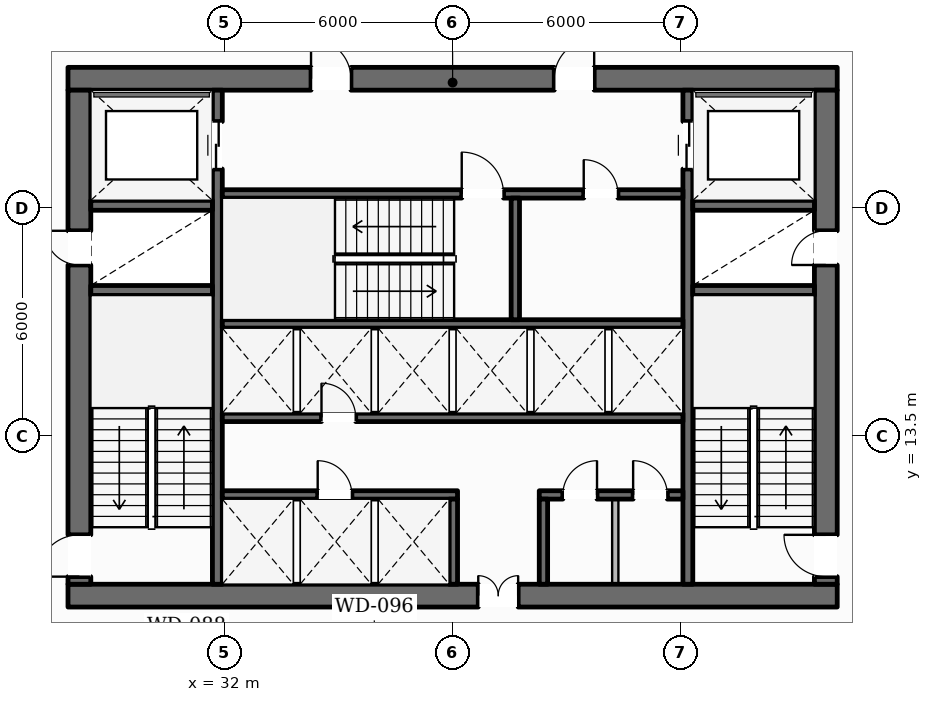
"""IFC4 building model, lengths in metres.
Left out: names, types, materials, properties, quantities, classifications, styles, units other than length and angle.
Written with IfcOpenShell. Run it as: python <this file> out.ifc"""

import sys

from ifc_helpers import new_model, si_unit, direction, frame, frame_2d, origin, place, context, subcontext, project, spatial, rectangle, extrude, element, fill, save


model = new_model("IFC4")
c1 = context("Model", 3, precision=1e-05, world=origin(), true_north=direction((0.0, 1.0)))
c2 = subcontext(c1, "Body", "Model", "MODEL_VIEW")
j1 = project(units=[si_unit("LENGTHUNIT", "METRE"), si_unit("PLANEANGLEUNIT", "RADIAN")], contexts=[c1])
p1 = place(None, origin())
s1 = spatial("IfcSite", under=j1, at=p1, CompositionType="ELEMENT")
p2 = place(p1, origin())
s2 = spatial("IfcBuilding", under=s1, at=p2, CompositionType="ELEMENT")
p3 = place(p2, frame((0.0, 0.0, -4.2)))
s3 = spatial("IfcBuildingStorey", under=s2, at=p3, CompositionType="ELEMENT", Elevation=-4.2)
for number, where, z_axis, x_axis in (
    (1, (29.622, 43.889, 0.0), (0.0, 0.0, 1.0), (-0.5, -0.866, 0.0)),
    (2, (62.878, 15.311, 0.0), (0.0, 0.0, 1.0), (-0.5, 0.866, 0.0)),
):
    element("IfcWall", number, at=place(p3, frame(where, z_axis=z_axis, x_axis=x_axis)), inside=s3, PredefinedType="SHEAR", context=c2, shape_type="SweptSolid", body=[
        extrude(rectangle(XDim=33.0, YDim=0.5, at=frame_2d((16.5, 0.0))), origin(), (0.0, 0.0, 1.0), 3.94),
    ])
p4 = place(p3, frame((27.88, 9.3, 0.0), z_axis=(0.0, 0.0, 1.0), x_axis=(1.0, 0.0, 0.0)))
e3 = element("IfcWall", 3, at=p4, inside=s3, PredefinedType="SOLIDWALL", context=c2, shape_type="SweptSolid", body=[
    extrude(rectangle(XDim=20.24, YDim=0.6, at=frame_2d((10.12, 0.0))), origin(), (0.0, 0.0, 1.0), 3.94),
])
p5 = place(p4, frame((10.795, 0.0, 0.0)))
e4 = element("IfcOpeningElement", 4, at=p5, cuts=e3, PredefinedType="OPENING", context=c2, shape_type="SweptSolid", body=[
    extrude(rectangle(XDim=1.05, YDim=2.15, at=frame_2d((0.525, 1.075))), frame((0.0, 0.31, 0.0), z_axis=(0.0, -1.0, 0.0), x_axis=(1.0, 0.0, 0.0)), (0.0, 0.0, 1.0), 0.62),
])
p6 = place(p3, frame((27.88, 22.9, 0.0), z_axis=(0.0, 0.0, 1.0), x_axis=(1.0, 0.0, 0.0)))
e5 = element("IfcWall", 5, at=p6, inside=s3, PredefinedType="SOLIDWALL", context=c2, shape_type="SweptSolid", body=[
    extrude(rectangle(XDim=20.24, YDim=0.6, at=frame_2d((10.12, 0.0))), origin(), (0.0, 0.0, 1.0), 3.94),
])
p7 = place(p6, frame((6.395, 0.0, 0.0)))
e6 = element("IfcOpeningElement", 6, at=p7, cuts=e5, PredefinedType="OPENING", context=c2, shape_type="SweptSolid", body=[
    extrude(rectangle(XDim=1.05, YDim=2.15, at=frame_2d((0.525, 1.075))), frame((0.0, 0.31, 0.0), z_axis=(0.0, -1.0, 0.0), x_axis=(1.0, 0.0, 0.0)), (0.0, 0.0, 1.0), 0.62),
])
p8 = place(p6, frame((12.795, 0.0, 0.0)))
e7 = element("IfcOpeningElement", 7, at=p8, cuts=e5, PredefinedType="OPENING", context=c2, shape_type="SweptSolid", body=[
    extrude(rectangle(XDim=1.05, YDim=2.15, at=frame_2d((0.525, 1.075))), frame((0.0, 0.31, 0.0), z_axis=(0.0, -1.0, 0.0), x_axis=(1.0, 0.0, 0.0)), (0.0, 0.0, 1.0), 0.62),
])
p9 = place(p3, frame((28.18, 9.6, 0.0), z_axis=(0.0, 0.0, 1.0), x_axis=(0.0, 1.0, 0.0)))
e8 = element("IfcWall", 8, at=p9, inside=s3, PredefinedType="SOLIDWALL", context=c2, shape_type="SweptSolid", body=[
    extrude(rectangle(XDim=13.0, YDim=0.6, at=frame_2d((6.5, 0.0))), origin(), (0.0, 0.0, 1.0), 3.94),
])
p10 = place(p9, frame((0.2, 0.0, 0.0)))
e9 = element("IfcOpeningElement", 9, at=p10, cuts=e8, PredefinedType="OPENING", context=c2, shape_type="SweptSolid", body=[
    extrude(rectangle(XDim=1.1, YDim=2.15, at=frame_2d((0.55, 1.075))), frame((0.0, 0.31, 0.0), z_axis=(0.0, -1.0, 0.0), x_axis=(1.0, 0.0, 0.0)), (0.0, 0.0, 1.0), 0.62),
])
p11 = place(p9, frame((8.4, 0.0, 0.0)))
e10 = element("IfcOpeningElement", 10, at=p11, cuts=e8, PredefinedType="OPENING", context=c2, shape_type="SweptSolid", body=[
    extrude(rectangle(XDim=0.9, YDim=2.1, at=frame_2d((0.45, 1.05))), frame((0.0, 0.31, 0.0), z_axis=(0.0, -1.0, 0.0), x_axis=(1.0, 0.0, 0.0)), (0.0, 0.0, 1.0), 0.62),
])
p12 = place(p3, frame((47.82, 9.6, 0.0), z_axis=(0.0, 0.0, 1.0), x_axis=(0.0, 1.0, 0.0)))
e11 = element("IfcWall", 11, at=p12, inside=s3, PredefinedType="SOLIDWALL", context=c2, shape_type="SweptSolid", body=[
    extrude(rectangle(XDim=13.0, YDim=0.6, at=frame_2d((6.5, 0.0))), origin(), (0.0, 0.0, 1.0), 3.94),
])
p13 = place(p12, frame((0.2, 0.0, 0.0)))
e12 = element("IfcOpeningElement", 12, at=p13, cuts=e11, PredefinedType="OPENING", context=c2, shape_type="SweptSolid", body=[
    extrude(rectangle(XDim=1.1, YDim=2.15, at=frame_2d((0.55, 1.075))), frame((0.0, 0.31, 0.0), z_axis=(0.0, -1.0, 0.0), x_axis=(1.0, 0.0, 0.0)), (0.0, 0.0, 1.0), 0.62),
])
p14 = place(p12, frame((8.4, 0.0, 0.0)))
e13 = element("IfcOpeningElement", 13, at=p14, cuts=e11, PredefinedType="OPENING", context=c2, shape_type="SweptSolid", body=[
    extrude(rectangle(XDim=0.9, YDim=2.1, at=frame_2d((0.45, 1.05))), frame((0.0, 0.31, 0.0), z_axis=(0.0, -1.0, 0.0), x_axis=(1.0, 0.0, 0.0)), (0.0, 0.0, 1.0), 0.62),
])
p15 = place(p3, frame((31.81, 9.6, 0.0), z_axis=(0.0, 0.0, 1.0), x_axis=(0.0, 1.0, 0.0)))
e14 = element("IfcWall", 14, at=p15, inside=s3, PredefinedType="SHEAR", context=c2, shape_type="SweptSolid", body=[
    extrude(rectangle(XDim=13.0, YDim=0.26, at=frame_2d((6.5, 0.0))), origin(), (0.0, 0.0, 1.0), 3.94),
])
p16 = place(p15, frame((10.925, 0.0, 0.0)))
e15 = element("IfcOpeningElement", 15, at=p16, cuts=e14, PredefinedType="OPENING", context=c2, shape_type="SweptSolid", body=[
    extrude(rectangle(XDim=1.25, YDim=2.25, at=frame_2d((0.625, 1.125))), frame((0.0, 0.14, 0.0), z_axis=(0.0, -1.0, 0.0), x_axis=(1.0, 0.0, 0.0)), (0.0, 0.0, 1.0), 0.28),
])
p17 = place(p3, frame((44.19, 9.6, 0.0), z_axis=(0.0, 0.0, 1.0), x_axis=(0.0, 1.0, 0.0)))
e16 = element("IfcWall", 16, at=p17, inside=s3, PredefinedType="SHEAR", context=c2, shape_type="SweptSolid", body=[
    extrude(rectangle(XDim=13.0, YDim=0.26, at=frame_2d((6.5, 0.0))), origin(), (0.0, 0.0, 1.0), 3.94),
])
p18 = place(p17, frame((10.925, 0.0, 0.0)))
e17 = element("IfcOpeningElement", 17, at=p18, cuts=e16, PredefinedType="OPENING", context=c2, shape_type="SweptSolid", body=[
    extrude(rectangle(XDim=1.25, YDim=2.25, at=frame_2d((0.625, 1.125))), frame((0.0, 0.14, 0.0), z_axis=(0.0, -1.0, 0.0), x_axis=(1.0, 0.0, 0.0)), (0.0, 0.0, 1.0), 0.28),
])
for number, where, z_axis, x_axis in (
    (18, (28.48, 17.33, 0.0), (0.0, 0.0, 1.0), (1.0, 0.0, 0.0)),
    (19, (28.48, 19.57, 0.0), (0.0, 0.0, 1.0), (1.0, 0.0, 0.0)),
    (20, (44.32, 17.33, 0.0), (0.0, 0.0, 1.0), (1.0, 0.0, 0.0)),
    (21, (44.32, 19.57, 0.0), (0.0, 0.0, 1.0), (1.0, 0.0, 0.0)),
):
    element("IfcWall", number, at=place(p3, frame(where, z_axis=z_axis, x_axis=x_axis)), inside=s3, PredefinedType="SHEAR", context=c2, shape_type="SweptSolid", body=[
        extrude(rectangle(XDim=3.2, YDim=0.26, at=frame_2d((1.6, 0.0))), origin(), (0.0, 0.0, 1.0), 3.94),
    ])
p19 = place(p3, frame((31.94, 19.87, 0.0), z_axis=(0.0, 0.0, 1.0), x_axis=(1.0, 0.0, 0.0)))
e22 = element("IfcWall", 22, at=p19, inside=s3, PredefinedType="SOLIDWALL", context=c2, shape_type="SweptSolid", body=[
    extrude(rectangle(XDim=12.12, YDim=0.22, at=frame_2d((6.06, 0.0))), origin(), (0.0, 0.0, 1.0), 3.94),
])
p20 = place(p19, frame((6.3, 0.0, 0.0)))
e23 = element("IfcOpeningElement", 23, at=p20, cuts=e22, PredefinedType="OPENING", context=c2, shape_type="SweptSolid", body=[
    extrude(rectangle(XDim=1.1, YDim=2.15, at=frame_2d((0.55, 1.075))), frame((0.0, 0.12, 0.0), z_axis=(0.0, -1.0, 0.0), x_axis=(1.0, 0.0, 0.0)), (0.0, 0.0, 1.0), 0.24),
])
p21 = place(p19, frame((9.51, 0.0, 0.0)))
e24 = element("IfcOpeningElement", 24, at=p21, cuts=e22, PredefinedType="OPENING", context=c2, shape_type="SweptSolid", body=[
    extrude(rectangle(XDim=0.9, YDim=2.1, at=frame_2d((0.45, 1.05))), frame((0.0, 0.12, 0.0), z_axis=(0.0, -1.0, 0.0), x_axis=(1.0, 0.0, 0.0)), (0.0, 0.0, 1.0), 0.24),
])
p22 = place(p3, frame((31.94, 16.45, 0.0), z_axis=(0.0, 0.0, 1.0), x_axis=(1.0, 0.0, 0.0)))
e25 = element("IfcWall", 25, at=p22, inside=s3, PredefinedType="SOLIDWALL", context=c2, shape_type="SweptSolid", body=[
    extrude(rectangle(XDim=12.12, YDim=0.22, at=frame_2d((6.06, 0.0))), origin(), (0.0, 0.0, 1.0), 3.94),
])
p23 = place(p3, frame((39.65, 16.56, 0.0), z_axis=(0.0, 0.0, 1.0), x_axis=(0.0, 1.0, 0.0)))
e26 = element("IfcWall", 26, at=p23, inside=s3, PredefinedType="SOLIDWALL", context=c2, shape_type="SweptSolid", body=[
    extrude(rectangle(XDim=3.2, YDim=0.22, at=frame_2d((1.6, 0.0))), origin(), (0.0, 0.0, 1.0), 3.94),
])
p24 = place(p3, frame((31.94, 13.99, 0.0), z_axis=(0.0, 0.0, 1.0), x_axis=(1.0, 0.0, 0.0)))
e27 = element("IfcWall", 27, at=p24, inside=s3, PredefinedType="SOLIDWALL", context=c2, shape_type="SweptSolid", body=[
    extrude(rectangle(XDim=12.12, YDim=0.22, at=frame_2d((6.06, 0.0))), origin(), (0.0, 0.0, 1.0), 3.94),
])
p25 = place(p24, frame((2.61, 0.0, 0.0)))
e28 = element("IfcOpeningElement", 28, at=p25, cuts=e27, PredefinedType="OPENING", context=c2, shape_type="SweptSolid", body=[
    extrude(rectangle(XDim=0.9, YDim=2.1, at=frame_2d((0.45, 1.05))), frame((0.0, 0.12, 0.0), z_axis=(0.0, -1.0, 0.0), x_axis=(1.0, 0.0, 0.0)), (0.0, 0.0, 1.0), 0.24),
])
p26 = place(p3, frame((31.94, 11.95, 0.0), z_axis=(0.0, 0.0, 1.0), x_axis=(1.0, 0.0, 0.0)))
e29 = element("IfcWall", 29, at=p26, inside=s3, PredefinedType="SOLIDWALL", context=c2, shape_type="SweptSolid", body=[
    extrude(rectangle(XDim=6.19, YDim=0.22, at=frame_2d((3.095, 0.0))), origin(), (0.0, 0.0, 1.0), 3.94),
])
p27 = place(p26, frame((2.51, 0.0, 0.0)))
e30 = element("IfcOpeningElement", 30, at=p27, cuts=e29, PredefinedType="OPENING", context=c2, shape_type="SweptSolid", body=[
    extrude(rectangle(XDim=0.9, YDim=2.1, at=frame_2d((0.45, 1.05))), frame((0.0, 0.12, 0.0), z_axis=(0.0, -1.0, 0.0), x_axis=(1.0, 0.0, 0.0)), (0.0, 0.0, 1.0), 0.24),
])
p28 = place(p3, frame((40.28, 11.95, 0.0), z_axis=(0.0, 0.0, 1.0), x_axis=(1.0, 0.0, 0.0)))
e31 = element("IfcWall", 31, at=p28, inside=s3, PredefinedType="SOLIDWALL", context=c2, shape_type="SweptSolid", body=[
    extrude(rectangle(XDim=3.78, YDim=0.22, at=frame_2d((1.89, 0.0))), origin(), (0.0, 0.0, 1.0), 3.94),
])
p29 = place(p28, frame((0.62, 0.0, 0.0)))
e32 = element("IfcOpeningElement", 32, at=p29, cuts=e31, PredefinedType="OPENING", context=c2, shape_type="SweptSolid", body=[
    extrude(rectangle(XDim=0.9, YDim=2.1, at=frame_2d((0.45, 1.05))), frame((0.0, 0.12, 0.0), z_axis=(0.0, -1.0, 0.0), x_axis=(1.0, 0.0, 0.0)), (0.0, 0.0, 1.0), 0.24),
])
p30 = place(p28, frame((2.47, 0.0, 0.0)))
e33 = element("IfcOpeningElement", 33, at=p30, cuts=e31, PredefinedType="OPENING", context=c2, shape_type="SweptSolid", body=[
    extrude(rectangle(XDim=0.9, YDim=2.1, at=frame_2d((0.45, 1.05))), frame((0.0, 0.12, 0.0), z_axis=(0.0, -1.0, 0.0), x_axis=(1.0, 0.0, 0.0)), (0.0, 0.0, 1.0), 0.24),
])
for number, where, z_axis, x_axis in (
    (34, (38.02, 9.6, 0.0), (0.0, 0.0, 1.0), (0.0, 1.0, 0.0)),
    (35, (40.39, 9.6, 0.0), (0.0, 0.0, 1.0), (0.0, 1.0, 0.0)),
):
    element("IfcWall", number, at=place(p3, frame(where, z_axis=z_axis, x_axis=x_axis)), inside=s3, PredefinedType="SOLIDWALL", context=c2, shape_type="SweptSolid", body=[
        extrude(rectangle(XDim=2.24, YDim=0.22, at=frame_2d((1.12, 0.0))), origin(), (0.0, 0.0, 1.0), 3.94),
    ])
p31 = place(p3, frame((42.28, 9.6, 0.0), z_axis=(0.0, 0.0, 1.0), x_axis=(0.0, 1.0, 0.0)))
e36 = element("IfcWall", 36, at=p31, inside=s3, PredefinedType="PARTITIONING", context=c2, shape_type="SweptSolid", body=[
    extrude(rectangle(XDim=2.24, YDim=0.165, at=frame_2d((1.12, 0.0))), origin(), (0.0, 0.0, 1.0), 3.94),
])
p32 = place(p10, origin())
e37 = element("IfcDoor", 37, at=p32, inside=s3, OperationType="SINGLE_SWING_LEFT", PredefinedType="DOOR", context=c2, shape_type="SweptSolid", body=[
    extrude(rectangle(XDim=1.1, YDim=2.15, at=frame_2d((0.55, 1.075))), frame((0.0, 0.025, 0.0), z_axis=(0.0, -1.0, 0.0), x_axis=(1.0, 0.0, 0.0)), (0.0, 0.0, 1.0), 0.05),
])
fill(e9, e37)
p33 = place(p13, origin())
e38 = element("IfcDoor", 38, at=p33, inside=s3, OperationType="SINGLE_SWING_RIGHT", PredefinedType="DOOR", context=c2, shape_type="SweptSolid", body=[
    extrude(rectangle(XDim=1.1, YDim=2.15, at=frame_2d((0.55, 1.075))), frame((0.0, 0.025, 0.0), z_axis=(0.0, -1.0, 0.0), x_axis=(1.0, 0.0, 0.0)), (0.0, 0.0, 1.0), 0.05),
])
fill(e12, e38)
p34 = place(p20, origin())
e39 = element("IfcDoor", 39, at=p34, inside=s3, OperationType="SINGLE_SWING_LEFT", PredefinedType="DOOR", context=c2, shape_type="SweptSolid", body=[
    extrude(rectangle(XDim=1.1, YDim=2.15, at=frame_2d((0.55, 1.075))), frame((0.0, 0.025, 0.0), z_axis=(0.0, -1.0, 0.0), x_axis=(1.0, 0.0, 0.0)), (0.0, 0.0, 1.0), 0.05),
])
fill(e23, e39)
p35 = place(p11, origin())
e40 = element("IfcDoor", 40, at=p35, inside=s3, OperationType="SINGLE_SWING_RIGHT", PredefinedType="DOOR", context=c2, shape_type="SweptSolid", body=[
    extrude(rectangle(XDim=0.9, YDim=2.1, at=frame_2d((0.45, 1.05))), frame((0.0, 0.025, 0.0), z_axis=(0.0, -1.0, 0.0), x_axis=(1.0, 0.0, 0.0)), (0.0, 0.0, 1.0), 0.05),
])
fill(e10, e40)
p36 = place(p14, origin())
e41 = element("IfcDoor", 41, at=p36, inside=s3, OperationType="SINGLE_SWING_LEFT", PredefinedType="DOOR", context=c2, shape_type="SweptSolid", body=[
    extrude(rectangle(XDim=0.9, YDim=2.1, at=frame_2d((0.45, 1.05))), frame((0.0, 0.025, 0.0), z_axis=(0.0, -1.0, 0.0), x_axis=(1.0, 0.0, 0.0)), (0.0, 0.0, 1.0), 0.05),
])
fill(e13, e41)
p37 = place(p7, origin())
e42 = element("IfcDoor", 42, at=p37, inside=s3, OperationType="SINGLE_SWING_LEFT", PredefinedType="DOOR", context=c2, shape_type="SweptSolid", body=[
    extrude(rectangle(XDim=1.05, YDim=2.15, at=frame_2d((0.525, 1.075))), frame((0.0, 0.025, 0.0), z_axis=(0.0, -1.0, 0.0), x_axis=(1.0, 0.0, 0.0)), (0.0, 0.0, 1.0), 0.05),
])
fill(e6, e42)
p38 = place(p8, origin())
e43 = element("IfcDoor", 43, at=p38, inside=s3, OperationType="SINGLE_SWING_RIGHT", PredefinedType="DOOR", context=c2, shape_type="SweptSolid", body=[
    extrude(rectangle(XDim=1.05, YDim=2.15, at=frame_2d((0.525, 1.075))), frame((0.0, 0.025, 0.0), z_axis=(0.0, -1.0, 0.0), x_axis=(1.0, 0.0, 0.0)), (0.0, 0.0, 1.0), 0.05),
])
fill(e7, e43)
p39 = place(p16, origin())
e44 = element("IfcDoor", 44, at=p39, inside=s3, OperationType="DOUBLE_DOOR_SLIDING", PredefinedType="DOOR", context=c2, shape_type="SweptSolid", body=[
    extrude(rectangle(XDim=1.25, YDim=2.25, at=frame_2d((0.625, 1.125))), frame((0.0, 0.025, 0.0), z_axis=(0.0, -1.0, 0.0), x_axis=(1.0, 0.0, 0.0)), (0.0, 0.0, 1.0), 0.05),
])
fill(e15, e44)
p40 = place(p18, origin())
e45 = element("IfcDoor", 45, at=p40, inside=s3, OperationType="DOUBLE_DOOR_SLIDING", PredefinedType="DOOR", context=c2, shape_type="SweptSolid", body=[
    extrude(rectangle(XDim=1.25, YDim=2.25, at=frame_2d((0.625, 1.125))), frame((0.0, 0.025, 0.0), z_axis=(0.0, -1.0, 0.0), x_axis=(1.0, 0.0, 0.0)), (0.0, 0.0, 1.0), 0.05),
])
fill(e17, e45)
p41 = place(p5, origin())
e46 = element("IfcDoor", 46, at=p41, inside=s3, OperationType="DOUBLE_DOOR_SINGLE_SWING", PredefinedType="DOOR", context=c2, shape_type="SweptSolid", body=[
    extrude(rectangle(XDim=1.05, YDim=2.15, at=frame_2d((0.525, 1.075))), frame((0.0, 0.025, 0.0), z_axis=(0.0, -1.0, 0.0), x_axis=(1.0, 0.0, 0.0)), (0.0, 0.0, 1.0), 0.05),
])
fill(e4, e46)
p42 = place(p27, origin())
e47 = element("IfcDoor", 47, at=p42, inside=s3, OperationType="SINGLE_SWING_LEFT", PredefinedType="DOOR", context=c2, shape_type="SweptSolid", body=[
    extrude(rectangle(XDim=0.9, YDim=2.1, at=frame_2d((0.45, 1.05))), frame((0.0, 0.025, 0.0), z_axis=(0.0, -1.0, 0.0), x_axis=(1.0, 0.0, 0.0)), (0.0, 0.0, 1.0), 0.05),
])
fill(e30, e47)
p43 = place(p25, origin())
e48 = element("IfcDoor", 48, at=p43, inside=s3, OperationType="SINGLE_SWING_LEFT", PredefinedType="DOOR", context=c2, shape_type="SweptSolid", body=[
    extrude(rectangle(XDim=0.9, YDim=2.1, at=frame_2d((0.45, 1.05))), frame((0.0, 0.025, 0.0), z_axis=(0.0, -1.0, 0.0), x_axis=(1.0, 0.0, 0.0)), (0.0, 0.0, 1.0), 0.05),
])
fill(e28, e48)
p44 = place(p21, origin())
e49 = element("IfcDoor", 49, at=p44, inside=s3, OperationType="SINGLE_SWING_LEFT", PredefinedType="DOOR", context=c2, shape_type="SweptSolid", body=[
    extrude(rectangle(XDim=0.9, YDim=2.1, at=frame_2d((0.45, 1.05))), frame((0.0, 0.025, 0.0), z_axis=(0.0, -1.0, 0.0), x_axis=(1.0, 0.0, 0.0)), (0.0, 0.0, 1.0), 0.05),
])
fill(e24, e49)
p45 = place(p29, origin())
e50 = element("IfcDoor", 50, at=p45, inside=s3, OperationType="SINGLE_SWING_RIGHT", PredefinedType="DOOR", context=c2, shape_type="SweptSolid", body=[
    extrude(rectangle(XDim=0.9, YDim=2.1, at=frame_2d((0.45, 1.05))), frame((0.0, 0.025, 0.0), z_axis=(0.0, -1.0, 0.0), x_axis=(1.0, 0.0, 0.0)), (0.0, 0.0, 1.0), 0.05),
])
fill(e32, e50)
p46 = place(p30, origin())
e51 = element("IfcDoor", 51, at=p46, inside=s3, OperationType="SINGLE_SWING_LEFT", PredefinedType="DOOR", context=c2, shape_type="SweptSolid", body=[
    extrude(rectangle(XDim=0.9, YDim=2.1, at=frame_2d((0.45, 1.05))), frame((0.0, 0.025, 0.0), z_axis=(0.0, -1.0, 0.0), x_axis=(1.0, 0.0, 0.0)), (0.0, 0.0, 1.0), 0.05),
])
fill(e33, e51)
save(model, sys.argv[1])
